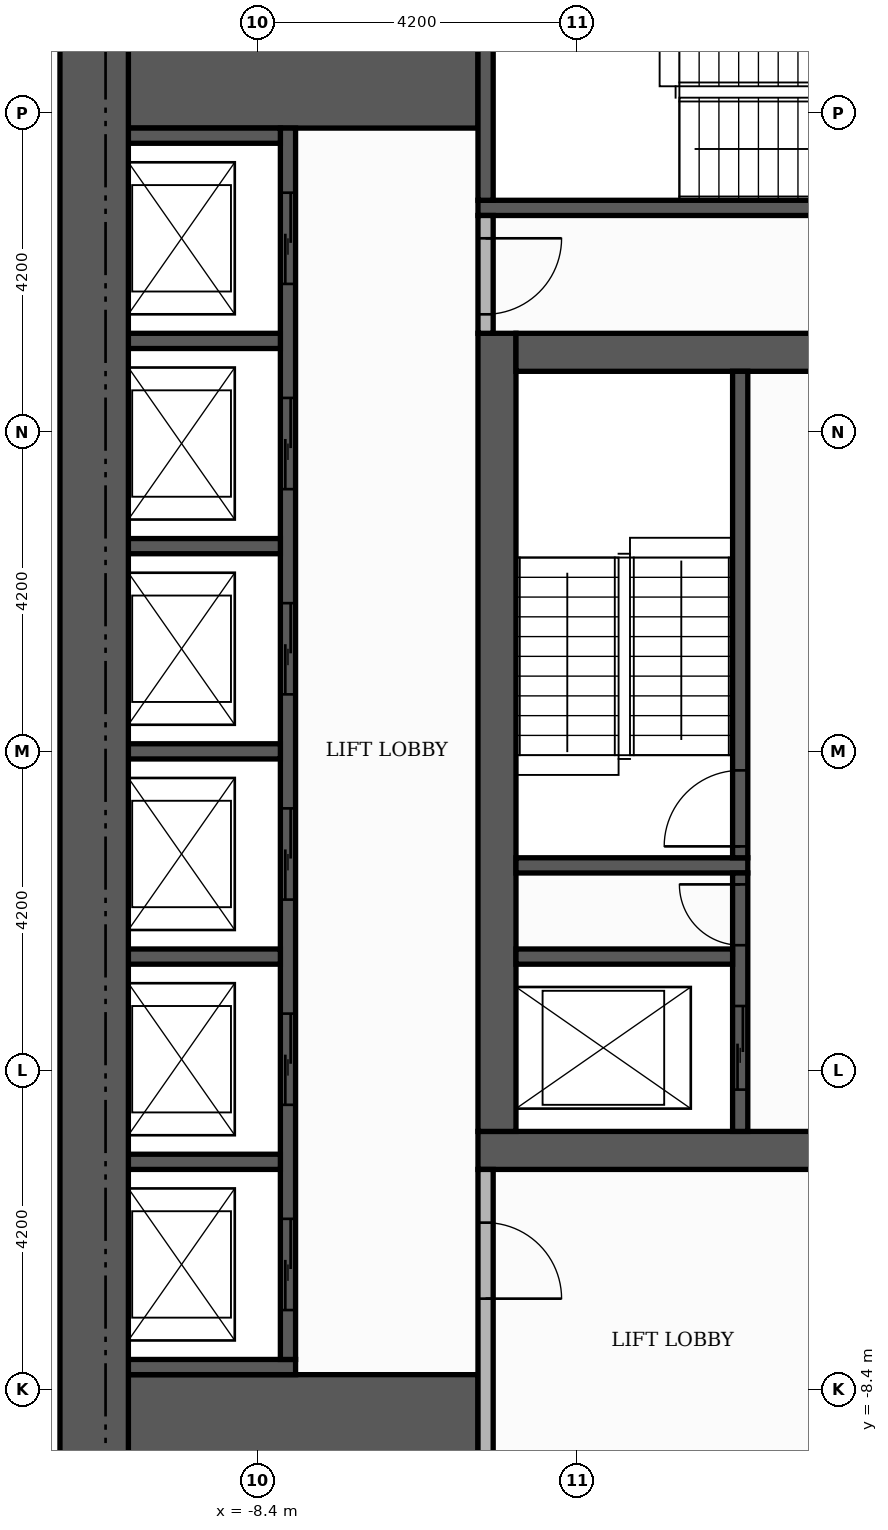
"""IFC4 building model, lengths in metres.
Left out: names, types, materials, properties, quantities, classifications, styles, units other than length and angle.
Written with IfcOpenShell. Run it as: python <this file> out.ifc"""

import sys

from ifc_helpers import new_model, si_unit, direction, frame, frame_2d, origin, place, context, subcontext, project, spatial, rectangle, extrude, element, fill, save


model = new_model("IFC4")
c1 = context("Model", 3, precision=1e-05, world=origin(), true_north=direction((0.0, 1.0)))
c2 = subcontext(c1, "Body", "Model", "MODEL_VIEW")
j1 = project(units=[si_unit("LENGTHUNIT", "METRE"), si_unit("PLANEANGLEUNIT", "RADIAN")], contexts=[c1])
p1 = place(None, origin())
s1 = spatial("IfcSite", under=j1, at=p1, CompositionType="ELEMENT")
p2 = place(p1, origin())
s2 = spatial("IfcBuilding", under=s1, at=p2, CompositionType="ELEMENT")
p3 = place(p2, frame((0.0, 0.0, 110.4)))
s3 = spatial("IfcBuildingStorey", under=s2, at=p3, CompositionType="ELEMENT", Elevation=110.4)
p4 = place(p3, frame((-5.5, -5.25, 0.0), z_axis=(0.0, 0.0, 1.0), x_axis=(1.0, 0.0, 0.0)))
e1 = element("IfcWall", 1, at=p4, inside=s3, PredefinedType="SHEAR", context=c2, shape_type="SweptSolid", body=[
    extrude(rectangle(XDim=11.0, YDim=0.5, at=frame_2d((5.5, 0.0))), origin(), (0.0, 0.0, 1.0), 3.48),
])
p5 = place(p4, frame((4.9, 0.0, 0.0)))
e2 = element("IfcOpeningElement", 2, at=p5, cuts=e1, PredefinedType="OPENING", context=c2, shape_type="SweptSolid", body=[
    extrude(rectangle(XDim=1.2, YDim=2.1, at=frame_2d((0.6, 1.05))), frame((0.0, 0.26, 0.0), z_axis=(0.0, -1.0, 0.0), x_axis=(1.0, 0.0, 0.0)), (0.0, 0.0, 1.0), 0.52),
])
p6 = place(p3, frame((-5.25, -5.0, 0.0), z_axis=(0.0, 0.0, 1.0), x_axis=(0.0, 1.0, 0.0)))
e3 = element("IfcWall", 3, at=p6, inside=s3, PredefinedType="SHEAR", context=c2, shape_type="SweptSolid", body=[
    extrude(rectangle(XDim=10.5, YDim=0.5, at=frame_2d((5.25, 0.0))), origin(), (0.0, 0.0, 1.0), 3.48),
])
p7 = place(p3, frame((-5.0, 5.25, 0.0), z_axis=(0.0, 0.0, 1.0), x_axis=(1.0, 0.0, 0.0)))
e4 = element("IfcWall", 4, at=p7, inside=s3, PredefinedType="SHEAR", context=c2, shape_type="SweptSolid", body=[
    extrude(rectangle(XDim=10.0, YDim=0.5, at=frame_2d((5.0, 0.0))), origin(), (0.0, 0.0, 1.0), 3.48),
])
p8 = place(p7, frame((4.4, 0.0, 0.0)))
e5 = element("IfcOpeningElement", 5, at=p8, cuts=e4, PredefinedType="OPENING", context=c2, shape_type="SweptSolid", body=[
    extrude(rectangle(XDim=1.2, YDim=2.1, at=frame_2d((0.6, 1.05))), frame((0.0, 0.26, 0.0), z_axis=(0.0, -1.0, 0.0), x_axis=(1.0, 0.0, 0.0)), (0.0, 0.0, 1.0), 0.52),
])
for number, where, z_axis, x_axis in (
    (6, (-10.1, -9.15, 0.0), (0.0, 0.0, 1.0), (1.0, 0.0, 0.0)),
    (7, (-10.1, 9.15, 0.0), (0.0, 0.0, 1.0), (1.0, 0.0, 0.0)),
):
    element("IfcWall", number, at=place(p3, frame(where, z_axis=z_axis, x_axis=x_axis)), inside=s3, PredefinedType="SHEAR", context=c2, shape_type="SweptSolid", body=[
        extrude(rectangle(XDim=4.6, YDim=1.9, at=frame_2d((2.3, 0.0))), origin(), (0.0, 0.0, 1.0), 3.48),
    ])
p9 = place(p3, frame((-5.0, -1.5, 0.0), z_axis=(0.0, 0.0, 1.0), x_axis=(1.0, 0.0, 0.0)))
e8 = element("IfcWall", 8, at=p9, inside=s3, PredefinedType="SHEAR", context=c2, shape_type="SweptSolid", body=[
    extrude(rectangle(XDim=3.05, YDim=0.2, at=frame_2d((1.525, 0.0))), origin(), (0.0, 0.0, 1.0), 3.48),
])
p10 = place(p3, frame((-2.05, -1.4, 0.0), z_axis=(0.0, 0.0, 1.0), x_axis=(0.0, 1.0, 0.0)))
e9 = element("IfcWall", 9, at=p10, inside=s3, PredefinedType="SHEAR", context=c2, shape_type="SweptSolid", body=[
    extrude(rectangle(XDim=6.4, YDim=0.2, at=frame_2d((3.2, 0.0))), origin(), (0.0, 0.0, 1.0), 3.48),
])
p11 = place(p10, frame((0.15, 0.0, 0.0)))
e10 = element("IfcOpeningElement", 10, at=p11, cuts=e9, PredefinedType="OPENING", context=c2, shape_type="SweptSolid", body=[
    extrude(rectangle(XDim=1.0, YDim=2.1, at=frame_2d((0.5, 1.05))), frame((0.0, 0.11, 0.0), z_axis=(0.0, -1.0, 0.0), x_axis=(1.0, 0.0, 0.0)), (0.0, 0.0, 1.0), 0.22),
])
p12 = place(p3, frame((-5.5, 7.15, 0.0), z_axis=(0.0, 0.0, 1.0), x_axis=(1.0, 0.0, 0.0)))
e11 = element("IfcWall", 11, at=p12, inside=s3, PredefinedType="SHEAR", context=c2, shape_type="SweptSolid", body=[
    extrude(rectangle(XDim=6.8, YDim=0.2, at=frame_2d((3.4, 0.0))), origin(), (0.0, 0.0, 1.0), 3.48),
])
p13 = place(p3, frame((-5.4, 7.25, 0.0), z_axis=(0.0, 0.0, 1.0), x_axis=(0.0, 1.0, 0.0)))
e12 = element("IfcWall", 12, at=p13, inside=s3, PredefinedType="SHEAR", context=c2, shape_type="SweptSolid", body=[
    extrude(rectangle(XDim=2.85, YDim=0.2, at=frame_2d((1.425, 0.0))), origin(), (0.0, 0.0, 1.0), 3.48),
])
p14 = place(p3, frame((-10.1, -8.1, 0.0), z_axis=(0.0, 0.0, 1.0), x_axis=(1.0, 0.0, 0.0)))
e13 = element("IfcWall", 13, at=p14, inside=s3, PredefinedType="SHEAR", context=c2, shape_type="SweptSolid", body=[
    extrude(rectangle(XDim=2.2, YDim=0.2, at=frame_2d((1.1, 0.0))), origin(), (0.0, 0.0, 1.0), 3.48),
])
p15 = place(p3, frame((-8.0, -8.0, 0.0), z_axis=(0.0, 0.0, 1.0), x_axis=(0.0, 1.0, 0.0)))
e14 = element("IfcWall", 14, at=p15, inside=s3, PredefinedType="SHEAR", context=c2, shape_type="SweptSolid", body=[
    extrude(rectangle(XDim=16.2, YDim=0.2, at=frame_2d((8.1, 0.0))), origin(), (0.0, 0.0, 1.0), 3.48),
])
p16 = place(p15, frame((0.65, 0.0, 0.0)))
e15 = element("IfcOpeningElement", 15, at=p16, cuts=e14, PredefinedType="OPENING", context=c2, shape_type="SweptSolid", body=[
    extrude(rectangle(XDim=1.2, YDim=2.1, at=frame_2d((0.6, 1.05))), frame((0.0, 0.11, 0.0), z_axis=(0.0, -1.0, 0.0), x_axis=(1.0, 0.0, 0.0)), (0.0, 0.0, 1.0), 0.22),
])
p17 = place(p15, frame((3.35, 0.0, 0.0)))
e16 = element("IfcOpeningElement", 16, at=p17, cuts=e14, PredefinedType="OPENING", context=c2, shape_type="SweptSolid", body=[
    extrude(rectangle(XDim=1.2, YDim=2.1, at=frame_2d((0.6, 1.05))), frame((0.0, 0.11, 0.0), z_axis=(0.0, -1.0, 0.0), x_axis=(1.0, 0.0, 0.0)), (0.0, 0.0, 1.0), 0.22),
])
p18 = place(p15, frame((6.05, 0.0, 0.0)))
e17 = element("IfcOpeningElement", 17, at=p18, cuts=e14, PredefinedType="OPENING", context=c2, shape_type="SweptSolid", body=[
    extrude(rectangle(XDim=1.2, YDim=2.1, at=frame_2d((0.6, 1.05))), frame((0.0, 0.11, 0.0), z_axis=(0.0, -1.0, 0.0), x_axis=(1.0, 0.0, 0.0)), (0.0, 0.0, 1.0), 0.22),
])
p19 = place(p15, frame((8.75, 0.0, 0.0)))
e18 = element("IfcOpeningElement", 18, at=p19, cuts=e14, PredefinedType="OPENING", context=c2, shape_type="SweptSolid", body=[
    extrude(rectangle(XDim=1.2, YDim=2.1, at=frame_2d((0.6, 1.05))), frame((0.0, 0.11, 0.0), z_axis=(0.0, -1.0, 0.0), x_axis=(1.0, 0.0, 0.0)), (0.0, 0.0, 1.0), 0.22),
])
p20 = place(p15, frame((11.45, 0.0, 0.0)))
e19 = element("IfcOpeningElement", 19, at=p20, cuts=e14, PredefinedType="OPENING", context=c2, shape_type="SweptSolid", body=[
    extrude(rectangle(XDim=1.2, YDim=2.1, at=frame_2d((0.6, 1.05))), frame((0.0, 0.11, 0.0), z_axis=(0.0, -1.0, 0.0), x_axis=(1.0, 0.0, 0.0)), (0.0, 0.0, 1.0), 0.22),
])
p21 = place(p15, frame((14.15, 0.0, 0.0)))
e20 = element("IfcOpeningElement", 20, at=p21, cuts=e14, PredefinedType="OPENING", context=c2, shape_type="SweptSolid", body=[
    extrude(rectangle(XDim=1.2, YDim=2.1, at=frame_2d((0.6, 1.05))), frame((0.0, 0.11, 0.0), z_axis=(0.0, -1.0, 0.0), x_axis=(1.0, 0.0, 0.0)), (0.0, 0.0, 1.0), 0.22),
])
p22 = place(p3, frame((-10.1, -5.4, 0.0), z_axis=(0.0, 0.0, 1.0), x_axis=(1.0, 0.0, 0.0)))
e21 = element("IfcWall", 21, at=p22, inside=s3, PredefinedType="SHEAR", context=c2, shape_type="SweptSolid", body=[
    extrude(rectangle(XDim=2.0, YDim=0.2, at=frame_2d((1.0, 0.0))), origin(), (0.0, 0.0, 1.0), 3.48),
])
p23 = place(p3, frame((-2.05, -5.0, 0.0), z_axis=(0.0, 0.0, 1.0), x_axis=(0.0, 1.0, 0.0)))
e22 = element("IfcWall", 22, at=p23, inside=s3, PredefinedType="SHEAR", context=c2, shape_type="SweptSolid", body=[
    extrude(rectangle(XDim=3.4, YDim=0.2, at=frame_2d((1.7, 0.0))), origin(), (0.0, 0.0, 1.0), 3.48),
])
p24 = place(p23, frame((0.55, 0.0, 0.0)))
e23 = element("IfcOpeningElement", 23, at=p24, cuts=e22, PredefinedType="OPENING", context=c2, shape_type="SweptSolid", body=[
    extrude(rectangle(XDim=1.1, YDim=2.1, at=frame_2d((0.55, 1.05))), frame((0.0, 0.11, 0.0), z_axis=(0.0, -1.0, 0.0), x_axis=(1.0, 0.0, 0.0)), (0.0, 0.0, 1.0), 0.22),
])
p25 = place(p23, frame((2.45, 0.0, 0.0)))
e24 = element("IfcOpeningElement", 24, at=p25, cuts=e22, PredefinedType="OPENING", context=c2, shape_type="SweptSolid", body=[
    extrude(rectangle(XDim=0.8, YDim=2.1, at=frame_2d((0.4, 1.05))), frame((0.0, 0.11, 0.0), z_axis=(0.0, -1.0, 0.0), x_axis=(1.0, 0.0, 0.0)), (0.0, 0.0, 1.0), 0.22),
])
p26 = place(p3, frame((-10.1, -2.7, 0.0), z_axis=(0.0, 0.0, 1.0), x_axis=(1.0, 0.0, 0.0)))
e25 = element("IfcWall", 25, at=p26, inside=s3, PredefinedType="SHEAR", context=c2, shape_type="SweptSolid", body=[
    extrude(rectangle(XDim=2.0, YDim=0.2, at=frame_2d((1.0, 0.0))), origin(), (0.0, 0.0, 1.0), 3.48),
])
p27 = place(p3, frame((-5.0, -2.7, 0.0), z_axis=(0.0, 0.0, 1.0), x_axis=(1.0, 0.0, 0.0)))
e26 = element("IfcWall", 26, at=p27, inside=s3, PredefinedType="SHEAR", context=c2, shape_type="SweptSolid", body=[
    extrude(rectangle(XDim=2.85, YDim=0.2, at=frame_2d((1.425, 0.0))), origin(), (0.0, 0.0, 1.0), 3.48),
])
for number, where, z_axis, x_axis in (
    (27, (-10.1, 0.0, 0.0), (0.0, 0.0, 1.0), (1.0, 0.0, 0.0)),
    (28, (-10.1, 2.7, 0.0), (0.0, 0.0, 1.0), (1.0, 0.0, 0.0)),
    (29, (-10.1, 5.4, 0.0), (0.0, 0.0, 1.0), (1.0, 0.0, 0.0)),
    (30, (-10.1, 8.1, 0.0), (0.0, 0.0, 1.0), (1.0, 0.0, 0.0)),
):
    element("IfcWall", number, at=place(p3, frame(where, z_axis=z_axis, x_axis=x_axis)), inside=s3, PredefinedType="SHEAR", context=c2, shape_type="SweptSolid", body=[
        extrude(rectangle(XDim=2.0, YDim=0.2, at=frame_2d((1.0, 0.0))), origin(), (0.0, 0.0, 1.0), 3.48),
    ])
p28 = place(p3, frame((-10.55, -10.1, 0.0), z_axis=(0.0, 0.0, 1.0), x_axis=(0.0, 1.0, 0.0)))
e31 = element("IfcWall", 31, at=p28, inside=s3, PredefinedType="SHEAR", context=c2, shape_type="SweptSolid", body=[
    extrude(rectangle(XDim=20.2, YDim=0.9, at=frame_2d((10.1, 0.0))), origin(), (0.0, 0.0, 1.0), 3.48),
])
p29 = place(p3, frame((-5.4, -10.1, 0.0), z_axis=(0.0, 0.0, 1.0), x_axis=(0.0, 1.0, 0.0)))
e32 = element("IfcWall", 32, at=p29, inside=s3, PredefinedType="PARTITIONING", context=c2, shape_type="SweptSolid", body=[
    extrude(rectangle(XDim=4.6, YDim=0.2, at=frame_2d((2.3, 0.0))), origin(), (0.0, 0.0, 1.0), 3.48),
])
p30 = place(p29, frame((2.9, 0.0, 0.0)))
e33 = element("IfcOpeningElement", 33, at=p30, cuts=e32, PredefinedType="OPENING", context=c2, shape_type="SweptSolid", body=[
    extrude(rectangle(XDim=1.0, YDim=2.1, at=frame_2d((0.5, 1.05))), frame((0.0, 0.11, 0.0), z_axis=(0.0, -1.0, 0.0), x_axis=(1.0, 0.0, 0.0)), (0.0, 0.0, 1.0), 0.22),
])
p31 = place(p3, frame((-5.4, 5.5, 0.0), z_axis=(0.0, 0.0, 1.0), x_axis=(0.0, 1.0, 0.0)))
e34 = element("IfcWall", 34, at=p31, inside=s3, PredefinedType="PARTITIONING", context=c2, shape_type="SweptSolid", body=[
    extrude(rectangle(XDim=1.55, YDim=0.2, at=frame_2d((0.775, 0.0))), origin(), (0.0, 0.0, 1.0), 3.48),
])
p32 = place(p31, frame((0.25, 0.0, 0.0)))
e35 = element("IfcOpeningElement", 35, at=p32, cuts=e34, PredefinedType="OPENING", context=c2, shape_type="SweptSolid", body=[
    extrude(rectangle(XDim=1.0, YDim=2.1, at=frame_2d((0.5, 1.05))), frame((0.0, 0.11, 0.0), z_axis=(0.0, -1.0, 0.0), x_axis=(1.0, 0.0, 0.0)), (0.0, 0.0, 1.0), 0.22),
])
p33 = place(p16, origin())
e36 = element("IfcDoor", 36, at=p33, inside=s3, OperationType="SLIDING_TO_LEFT", PredefinedType="DOOR", context=c2, shape_type="SweptSolid", body=[
    extrude(rectangle(XDim=1.2, YDim=2.1, at=frame_2d((0.6, 1.05))), frame((0.0, 0.025, 0.0), z_axis=(0.0, -1.0, 0.0), x_axis=(1.0, 0.0, 0.0)), (0.0, 0.0, 1.0), 0.05),
])
fill(e15, e36)
p34 = place(p17, origin())
e37 = element("IfcDoor", 37, at=p34, inside=s3, OperationType="SLIDING_TO_LEFT", PredefinedType="DOOR", context=c2, shape_type="SweptSolid", body=[
    extrude(rectangle(XDim=1.2, YDim=2.1, at=frame_2d((0.6, 1.05))), frame((0.0, 0.025, 0.0), z_axis=(0.0, -1.0, 0.0), x_axis=(1.0, 0.0, 0.0)), (0.0, 0.0, 1.0), 0.05),
])
fill(e16, e37)
p35 = place(p18, origin())
e38 = element("IfcDoor", 38, at=p35, inside=s3, OperationType="SLIDING_TO_LEFT", PredefinedType="DOOR", context=c2, shape_type="SweptSolid", body=[
    extrude(rectangle(XDim=1.2, YDim=2.1, at=frame_2d((0.6, 1.05))), frame((0.0, 0.025, 0.0), z_axis=(0.0, -1.0, 0.0), x_axis=(1.0, 0.0, 0.0)), (0.0, 0.0, 1.0), 0.05),
])
fill(e17, e38)
p36 = place(p19, origin())
e39 = element("IfcDoor", 39, at=p36, inside=s3, OperationType="SLIDING_TO_LEFT", PredefinedType="DOOR", context=c2, shape_type="SweptSolid", body=[
    extrude(rectangle(XDim=1.2, YDim=2.1, at=frame_2d((0.6, 1.05))), frame((0.0, 0.025, 0.0), z_axis=(0.0, -1.0, 0.0), x_axis=(1.0, 0.0, 0.0)), (0.0, 0.0, 1.0), 0.05),
])
fill(e18, e39)
p37 = place(p20, origin())
e40 = element("IfcDoor", 40, at=p37, inside=s3, OperationType="SLIDING_TO_LEFT", PredefinedType="DOOR", context=c2, shape_type="SweptSolid", body=[
    extrude(rectangle(XDim=1.2, YDim=2.1, at=frame_2d((0.6, 1.05))), frame((0.0, 0.025, 0.0), z_axis=(0.0, -1.0, 0.0), x_axis=(1.0, 0.0, 0.0)), (0.0, 0.0, 1.0), 0.05),
])
fill(e19, e40)
p38 = place(p21, origin())
e41 = element("IfcDoor", 41, at=p38, inside=s3, OperationType="SLIDING_TO_LEFT", PredefinedType="DOOR", context=c2, shape_type="SweptSolid", body=[
    extrude(rectangle(XDim=1.2, YDim=2.1, at=frame_2d((0.6, 1.05))), frame((0.0, 0.025, 0.0), z_axis=(0.0, -1.0, 0.0), x_axis=(1.0, 0.0, 0.0)), (0.0, 0.0, 1.0), 0.05),
])
fill(e20, e41)
p39 = place(p24, origin())
e42 = element("IfcDoor", 42, at=p39, inside=s3, OperationType="SLIDING_TO_LEFT", PredefinedType="DOOR", context=c2, shape_type="SweptSolid", body=[
    extrude(rectangle(XDim=1.1, YDim=2.1, at=frame_2d((0.55, 1.05))), frame((0.0, 0.025, 0.0), z_axis=(0.0, -1.0, 0.0), x_axis=(1.0, 0.0, 0.0)), (0.0, 0.0, 1.0), 0.05),
])
fill(e23, e42)
p40 = place(p11, origin())
e43 = element("IfcDoor", 43, at=p40, inside=s3, OperationType="SINGLE_SWING_LEFT", PredefinedType="DOOR", context=c2, shape_type="SweptSolid", body=[
    extrude(rectangle(XDim=1.0, YDim=2.1, at=frame_2d((0.5, 1.05))), frame((0.0, 0.025, 0.0), z_axis=(0.0, -1.0, 0.0), x_axis=(1.0, 0.0, 0.0)), (0.0, 0.0, 1.0), 0.05),
])
fill(e10, e43)
p41 = place(p25, origin())
e44 = element("IfcDoor", 44, at=p41, inside=s3, OperationType="SINGLE_SWING_RIGHT", PredefinedType="DOOR", context=c2, shape_type="SweptSolid", body=[
    extrude(rectangle(XDim=0.8, YDim=2.1, at=frame_2d((0.4, 1.05))), frame((0.0, 0.025, 0.0), z_axis=(0.0, -1.0, 0.0), x_axis=(1.0, 0.0, 0.0)), (0.0, 0.0, 1.0), 0.05),
])
fill(e24, e44)
p42 = place(p32, frame((1.0, 0.0, 0.0), z_axis=(0.0, 0.0, 1.0), x_axis=(-1.0, 0.0, 0.0)))
e45 = element("IfcDoor", 45, at=p42, inside=s3, OperationType="SINGLE_SWING_RIGHT", PredefinedType="DOOR", context=c2, shape_type="SweptSolid", body=[
    extrude(rectangle(XDim=1.0, YDim=2.1, at=frame_2d((0.5, 1.05))), frame((0.0, 0.025, 0.0), z_axis=(0.0, -1.0, 0.0), x_axis=(1.0, 0.0, 0.0)), (0.0, 0.0, 1.0), 0.05),
])
fill(e35, e45)
p43 = place(p30, frame((1.0, 0.0, 0.0), z_axis=(0.0, 0.0, 1.0), x_axis=(-1.0, 0.0, 0.0)))
e46 = element("IfcDoor", 46, at=p43, inside=s3, OperationType="SINGLE_SWING_LEFT", PredefinedType="DOOR", context=c2, shape_type="SweptSolid", body=[
    extrude(rectangle(XDim=1.0, YDim=2.1, at=frame_2d((0.5, 1.05))), frame((0.0, 0.025, 0.0), z_axis=(0.0, -1.0, 0.0), x_axis=(1.0, 0.0, 0.0)), (0.0, 0.0, 1.0), 0.05),
])
fill(e33, e46)
save(model, sys.argv[1])
